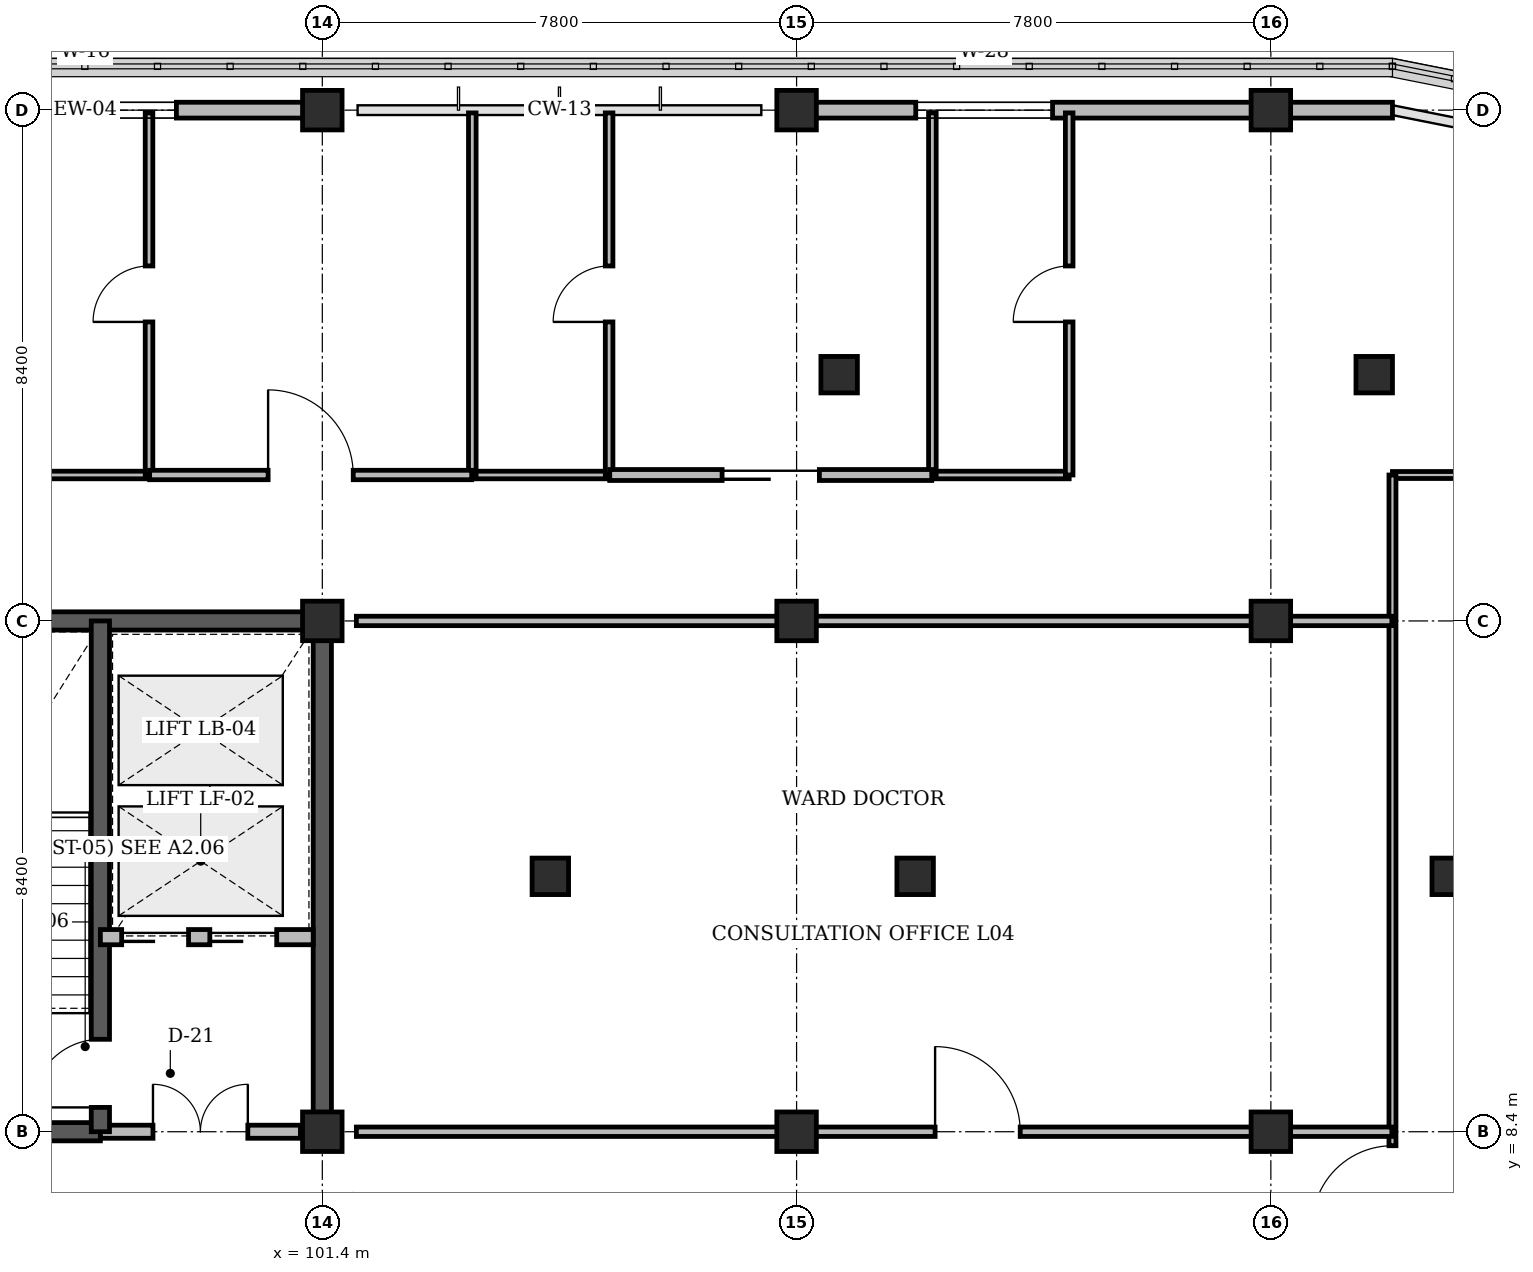
"""IFC4 building model, lengths in metres.
Left out: names, types, materials, properties, quantities, classifications, styles, units other than length and angle.
Written with IfcOpenShell. Run it as: python <this file> out.ifc"""

import sys

from ifc_helpers import new_model, si_unit, direction, frame, frame_2d, origin, origin_2d, place, context, subcontext, project, spatial, rectangle, circle, extrude, element, fill, save


model = new_model("IFC4")
c1 = context("Model", 3, precision=1e-05, world=origin(), true_north=direction((0.0, 1.0)))
c2 = subcontext(c1, "Body", "Model", "MODEL_VIEW")
j1 = project(units=[si_unit("LENGTHUNIT", "METRE"), si_unit("PLANEANGLEUNIT", "RADIAN")], contexts=[c1])
p1 = place(None, origin())
s1 = spatial("IfcSite", under=j1, at=p1, CompositionType="ELEMENT")
p2 = place(p1, origin())
s2 = spatial("IfcBuilding", under=s1, at=p2, CompositionType="ELEMENT")
p3 = place(p2, frame((0.0, 0.0, 18.0)))
s3 = spatial("IfcBuildingStorey", under=s2, at=p3, CompositionType="ELEMENT", Elevation=18.0)
p4 = place(p3, frame((93.45, 16.8, 0.0), z_axis=(0.0, 0.0, 1.0), x_axis=(1.0, 0.0, 0.0)))
e1 = element("IfcWall", 1, at=p4, inside=s3, PredefinedType="SHEAR", context=c2, shape_type="SweptSolid", body=[
    extrude(rectangle(XDim=8.1, YDim=0.3, at=frame_2d((4.05, 0.0))), origin(), (0.0, 0.0, 1.0), 3.92),
])
p5 = place(p3, frame((101.4, 8.4, 0.0), z_axis=(0.0, 0.0, 1.0), x_axis=(0.0, 1.0, 0.0)))
e2 = element("IfcWall", 2, at=p5, inside=s3, PredefinedType="SHEAR", context=c2, shape_type="SweptSolid", body=[
    extrude(rectangle(XDim=8.4, YDim=0.3, at=frame_2d((4.2, 0.0))), origin(), (0.0, 0.0, 1.0), 3.92),
])
for number, where, z_axis, x_axis in (
    (3, (101.4, 8.4, 0.0), (0.0, 0.0, 1.0), (1.0, 0.0, 0.0)),
    (4, (101.4, 16.8, 0.0), (0.0, 0.0, 1.0), (1.0, 0.0, 0.0)),
    (5, (101.4, 25.2, 0.0), (0.0, 0.0, 1.0), (1.0, 0.0, 0.0)),
    (6, (109.2, 8.4, 0.0), (0.0, 0.0, 1.0), (1.0, 0.0, 0.0)),
    (7, (109.2, 16.8, 0.0), (0.0, 0.0, 1.0), (1.0, 0.0, 0.0)),
    (8, (109.2, 25.2, 0.0), (0.0, 0.0, 1.0), (1.0, 0.0, 0.0)),
    (9, (117.0, 8.4, 0.0), (0.0, 0.0, 1.0), (1.0, 0.0, 0.0)),
    (10, (117.0, 16.8, 0.0), (0.0, 0.0, 1.0), (1.0, 0.0, 0.0)),
    (11, (117.0, 25.2, 0.0), (0.0, 0.0, 1.0), (1.0, 0.0, 0.0)),
):
    element("IfcColumn", number, at=place(p3, frame(where, z_axis=z_axis, x_axis=x_axis)), inside=s3, PredefinedType="COLUMN", context=c2, shape_type="SweptSolid", body=[
        extrude(rectangle(XDim=0.65, YDim=0.65, at=origin_2d()), origin(), (0.0, 0.0, 1.0), 4.2),
    ])
for number, where, z_axis, x_axis in (
    (12, (119.95, 12.6, 0.0), (0.0, 0.0, 1.0), (1.0, 0.0, 0.0)),
    (13, (118.7, 20.85, 0.0), (0.0, 0.0, 1.0), (1.0, 0.0, 0.0)),
    (14, (111.15, 12.6, 0.0), (0.0, 0.0, 1.0), (1.0, 0.0, 0.0)),
    (15, (109.9, 20.85, 0.0), (0.0, 0.0, 1.0), (1.0, 0.0, 0.0)),
    (16, (105.15, 12.6, 0.0), (0.0, 0.0, 1.0), (1.0, 0.0, 0.0)),
):
    element("IfcColumn", number, at=place(p3, frame(where, z_axis=z_axis, x_axis=x_axis)), inside=s3, PredefinedType="PILASTER", context=c2, shape_type="SweptSolid", body=[
        extrude(circle(Radius=0.3, at=origin_2d()), origin(), (0.0, 0.0, 1.0), 4.2),
    ])
p6 = place(p3, frame((93.89, 25.2, 0.0), z_axis=(0.0, 0.0, 1.0), x_axis=(1.0, 0.0, 0.0)))
e17 = element("IfcWall", 17, at=p6, inside=s3, PredefinedType="STANDARD", context=c2, shape_type="SweptSolid", body=[
    extrude(rectangle(XDim=7.22, YDim=0.26, at=frame_2d((3.61, 0.0))), origin(), (0.0, 0.0, 1.0), 3.255),
])
p7 = place(p6, frame((2.11, 0.0, 0.85)))
e18 = element("IfcOpeningElement", 18, at=p7, cuts=e17, PredefinedType="OPENING", context=c2, shape_type="SweptSolid", body=[
    extrude(rectangle(XDim=3.0, YDim=1.8, at=frame_2d((1.5, 0.9))), frame((0.0, 0.14, 0.0), z_axis=(0.0, -1.0, 0.0), x_axis=(1.0, 0.0, 0.0)), (0.0, 0.0, 1.0), 0.28),
])
p8 = place(p3, frame((109.49, 25.2, 0.0), z_axis=(0.0, 0.0, 1.0), x_axis=(1.0, 0.0, 0.0)))
e19 = element("IfcWall", 19, at=p8, inside=s3, PredefinedType="STANDARD", context=c2, shape_type="SweptSolid", body=[
    extrude(rectangle(XDim=9.51, YDim=0.26, at=frame_2d((4.755, 0.0))), origin(), (0.0, 0.0, 1.0), 3.255),
])
p9 = place(p8, frame((1.67, 0.0, 0.85)))
e20 = element("IfcOpeningElement", 20, at=p9, cuts=e19, PredefinedType="OPENING", context=c2, shape_type="SweptSolid", body=[
    extrude(rectangle(XDim=2.25, YDim=1.45, at=frame_2d((1.125, 0.725))), frame((0.0, 0.14, 0.0), z_axis=(0.0, -1.0, 0.0), x_axis=(1.0, 0.0, 0.0)), (0.0, 0.0, 1.0), 0.28),
])
p10 = place(p3, frame((93.6, 8.4, 0.0), z_axis=(0.0, 0.0, 1.0), x_axis=(1.0, 0.0, 0.0)))
e21 = element("IfcWall", 21, at=p10, inside=s3, PredefinedType="SHEAR", context=c2, shape_type="SweptSolid", body=[
    extrude(rectangle(XDim=4.15, YDim=0.3, at=frame_2d((2.075, 0.0))), origin(), (0.0, 0.0, 1.0), 4.2),
])
p11 = place(p10, frame((1.515, 0.0, 0.0)))
e22 = element("IfcOpeningElement", 22, at=p11, cuts=e21, PredefinedType="OPENING", context=c2, shape_type="SweptSolid", body=[
    extrude(rectangle(XDim=1.12, YDim=2.15, at=frame_2d((0.56, 1.075))), frame((0.0, 0.16, 0.0), z_axis=(0.0, -1.0, 0.0), x_axis=(1.0, 0.0, 0.0)), (0.0, 0.0, 1.0), 0.32),
])
p12 = place(p3, frame((97.75, 8.4, 0.0), z_axis=(0.0, 0.0, 1.0), x_axis=(1.0, 0.0, 0.0)))
e23 = element("IfcWall", 23, at=p12, inside=s3, PredefinedType="STANDARD", context=c2, shape_type="SweptSolid", body=[
    extrude(rectangle(XDim=3.29, YDim=0.215, at=frame_2d((1.645, 0.0))), origin(), (0.0, 0.0, 1.0), 3.22),
])
p13 = place(p12, frame((0.865, 0.0, 0.0)))
e24 = element("IfcOpeningElement", 24, at=p13, cuts=e23, PredefinedType="OPENING", context=c2, shape_type="SweptSolid", body=[
    extrude(rectangle(XDim=1.56, YDim=2.2, at=frame_2d((0.78, 1.1))), frame((0.0, 0.118, 0.0), z_axis=(0.0, -1.0, 0.0), x_axis=(1.0, 0.0, 0.0)), (0.0, 0.0, 1.0), 0.235),
])
p14 = place(p3, frame((97.75, 8.4, 0.0), z_axis=(0.0, 0.0, 1.0), x_axis=(0.0, 1.0, 0.0)))
e25 = element("IfcWall", 25, at=p14, inside=s3, PredefinedType="SHEAR", context=c2, shape_type="SweptSolid", body=[
    extrude(rectangle(XDim=8.4, YDim=0.3, at=frame_2d((4.2, 0.0))), origin(), (0.0, 0.0, 1.0), 4.2),
])
p15 = place(p14, frame((0.4, 0.0, 0.0)))
e26 = element("IfcOpeningElement", 26, at=p15, cuts=e25, PredefinedType="OPENING", context=c2, shape_type="SweptSolid", body=[
    extrude(rectangle(XDim=1.12, YDim=2.15, at=frame_2d((0.56, 1.075))), frame((0.0, 0.16, 0.0), z_axis=(0.0, -1.0, 0.0), x_axis=(1.0, 0.0, 0.0)), (0.0, 0.0, 1.0), 0.32),
])
p16 = place(p3, frame((97.75, 11.6, 0.0), z_axis=(0.0, 0.0, 1.0), x_axis=(1.0, 0.0, 0.0)))
e27 = element("IfcWall", 27, at=p16, inside=s3, PredefinedType="STANDARD", context=c2, shape_type="SweptSolid", body=[
    extrude(rectangle(XDim=3.5, YDim=0.25, at=frame_2d((1.75, 0.0))), origin(), (0.0, 0.0, 1.0), 3.9),
])
p17 = place(p16, frame((0.35, 0.0, 0.0)))
e28 = element("IfcOpeningElement", 28, at=p17, cuts=e27, PredefinedType="OPENING", context=c2, shape_type="SweptSolid", body=[
    extrude(rectangle(XDim=1.1, YDim=2.2, at=frame_2d((0.55, 1.1))), frame((0.0, 0.135, 0.0), z_axis=(0.0, -1.0, 0.0), x_axis=(1.0, 0.0, 0.0)), (0.0, 0.0, 1.0), 0.27),
])
p18 = place(p16, frame((1.8, 0.0, 0.0)))
e29 = element("IfcOpeningElement", 29, at=p18, cuts=e27, PredefinedType="OPENING", context=c2, shape_type="SweptSolid", body=[
    extrude(rectangle(XDim=1.1, YDim=2.2, at=frame_2d((0.55, 1.1))), frame((0.0, 0.135, 0.0), z_axis=(0.0, -1.0, 0.0), x_axis=(1.0, 0.0, 0.0)), (0.0, 0.0, 1.0), 0.27),
])
p19 = place(p3, frame((96.3, 19.2, 0.0), z_axis=(0.0, 0.0, 1.0), x_axis=(1.0, 0.0, 0.0)))
e30 = element("IfcWall", 30, at=p19, inside=s3, PredefinedType="PARTITIONING", context=c2, shape_type="SweptSolid", body=[
    extrude(rectangle(XDim=2.25, YDim=0.125, at=frame_2d((1.125, 0.0))), origin(), (0.0, 0.0, 1.0), 3.9),
])
p20 = place(p3, frame((98.55, 19.2, 0.0), z_axis=(0.0, 0.0, 1.0), x_axis=(0.0, 1.0, 0.0)))
e31 = element("IfcWall", 31, at=p20, inside=s3, PredefinedType="PARTITIONING", context=c2, shape_type="SweptSolid", body=[
    extrude(rectangle(XDim=5.955, YDim=0.125, at=frame_2d((2.978, 0.0))), origin(), (0.0, 0.0, 1.0), 3.9),
])
p21 = place(p20, frame((2.518, 0.0, 0.0)))
e32 = element("IfcOpeningElement", 32, at=p21, cuts=e31, PredefinedType="OPENING", context=c2, shape_type="SweptSolid", body=[
    extrude(rectangle(XDim=0.92, YDim=2.1, at=frame_2d((0.46, 1.05))), frame((0.0, 0.073, 0.0), z_axis=(0.0, -1.0, 0.0), x_axis=(1.0, 0.0, 0.0)), (0.0, 0.0, 1.0), 0.145),
])
p22 = place(p3, frame((103.867, 19.2, 0.0), z_axis=(0.0, 0.0, 1.0), x_axis=(1.0, 0.0, 0.0)))
e33 = element("IfcWall", 33, at=p22, inside=s3, PredefinedType="PARTITIONING", context=c2, shape_type="SweptSolid", body=[
    extrude(rectangle(XDim=2.25, YDim=0.125, at=frame_2d((1.125, 0.0))), origin(), (0.0, 0.0, 1.0), 3.9),
])
p23 = place(p3, frame((103.867, 19.2, 0.0), z_axis=(0.0, 0.0, 1.0), x_axis=(0.0, 1.0, 0.0)))
e34 = element("IfcWall", 34, at=p23, inside=s3, PredefinedType="PARTITIONING", context=c2, shape_type="SweptSolid", body=[
    extrude(rectangle(XDim=5.955, YDim=0.125, at=frame_2d((2.978, 0.0))), origin(), (0.0, 0.0, 1.0), 3.9),
])
p24 = place(p3, frame((106.117, 19.2, 0.0), z_axis=(0.0, 0.0, 1.0), x_axis=(0.0, 1.0, 0.0)))
e35 = element("IfcWall", 35, at=p24, inside=s3, PredefinedType="PARTITIONING", context=c2, shape_type="SweptSolid", body=[
    extrude(rectangle(XDim=5.955, YDim=0.125, at=frame_2d((2.978, 0.0))), origin(), (0.0, 0.0, 1.0), 3.9),
])
p25 = place(p24, frame((2.518, 0.0, 0.0)))
e36 = element("IfcOpeningElement", 36, at=p25, cuts=e35, PredefinedType="OPENING", context=c2, shape_type="SweptSolid", body=[
    extrude(rectangle(XDim=0.92, YDim=2.1, at=frame_2d((0.46, 1.05))), frame((0.0, 0.073, 0.0), z_axis=(0.0, -1.0, 0.0), x_axis=(1.0, 0.0, 0.0)), (0.0, 0.0, 1.0), 0.145),
])
p26 = place(p3, frame((111.433, 19.2, 0.0), z_axis=(0.0, 0.0, 1.0), x_axis=(1.0, 0.0, 0.0)))
e37 = element("IfcWall", 37, at=p26, inside=s3, PredefinedType="PARTITIONING", context=c2, shape_type="SweptSolid", body=[
    extrude(rectangle(XDim=2.25, YDim=0.125, at=frame_2d((1.125, 0.0))), origin(), (0.0, 0.0, 1.0), 3.9),
])
p27 = place(p3, frame((111.433, 19.2, 0.0), z_axis=(0.0, 0.0, 1.0), x_axis=(0.0, 1.0, 0.0)))
e38 = element("IfcWall", 38, at=p27, inside=s3, PredefinedType="PARTITIONING", context=c2, shape_type="SweptSolid", body=[
    extrude(rectangle(XDim=5.955, YDim=0.125, at=frame_2d((2.978, 0.0))), origin(), (0.0, 0.0, 1.0), 3.9),
])
p28 = place(p3, frame((113.683, 19.2, 0.0), z_axis=(0.0, 0.0, 1.0), x_axis=(0.0, 1.0, 0.0)))
e39 = element("IfcWall", 39, at=p28, inside=s3, PredefinedType="PARTITIONING", context=c2, shape_type="SweptSolid", body=[
    extrude(rectangle(XDim=5.955, YDim=0.125, at=frame_2d((2.978, 0.0))), origin(), (0.0, 0.0, 1.0), 3.9),
])
p29 = place(p28, frame((2.518, 0.0, 0.0)))
e40 = element("IfcOpeningElement", 40, at=p29, cuts=e39, PredefinedType="OPENING", context=c2, shape_type="SweptSolid", body=[
    extrude(rectangle(XDim=0.92, YDim=2.1, at=frame_2d((0.46, 1.05))), frame((0.0, 0.073, 0.0), z_axis=(0.0, -1.0, 0.0), x_axis=(1.0, 0.0, 0.0)), (0.0, 0.0, 1.0), 0.145),
])
p30 = place(p3, frame((119.0, 19.2, 0.0), z_axis=(0.0, 0.0, 1.0), x_axis=(1.0, 0.0, 0.0)))
e41 = element("IfcWall", 41, at=p30, inside=s3, PredefinedType="PARTITIONING", context=c2, shape_type="SweptSolid", body=[
    extrude(rectangle(XDim=12.1, YDim=0.115, at=frame_2d((6.05, 0.0))), origin(), (0.0, 0.0, 1.0), 3.9),
])
p31 = place(p3, frame((119.0, 6.0, 0.0), z_axis=(0.0, 0.0, 1.0), x_axis=(0.0, 1.0, 0.0)))
e42 = element("IfcWall", 42, at=p31, inside=s3, PredefinedType="PARTITIONING", context=c2, shape_type="SweptSolid", body=[
    extrude(rectangle(XDim=13.2, YDim=0.115, at=frame_2d((6.6, 0.0))), origin(), (0.0, 0.0, 1.0), 3.9),
])
p32 = place(p31, frame((0.85, 0.0, 0.0)))
e43 = element("IfcOpeningElement", 43, at=p32, cuts=e42, PredefinedType="OPENING", context=c2, shape_type="SweptSolid", body=[
    extrude(rectangle(XDim=1.32, YDim=2.15, at=frame_2d((0.66, 1.075))), frame((0.0, 0.067, 0.0), z_axis=(0.0, -1.0, 0.0), x_axis=(1.0, 0.0, 0.0)), (0.0, 0.0, 1.0), 0.135),
])
p33 = place(p3, frame((98.56, 19.2, 0.0), z_axis=(0.0, 0.0, 1.0), x_axis=(1.0, 0.0, 0.0)))
e44 = element("IfcWall", 44, at=p33, inside=s3, PredefinedType="PARTITIONING", context=c2, shape_type="SweptSolid", body=[
    extrude(rectangle(XDim=5.297, YDim=0.155, at=frame_2d((2.648, 0.0))), origin(), (0.0, 0.0, 1.0), 3.9),
])
p34 = place(p33, frame((1.948, 0.0, 0.0)))
e45 = element("IfcOpeningElement", 45, at=p34, cuts=e44, PredefinedType="OPENING", context=c2, shape_type="SweptSolid", body=[
    extrude(rectangle(XDim=1.4, YDim=2.2, at=frame_2d((0.7, 1.1))), frame((0.0, 0.087, 0.0), z_axis=(0.0, -1.0, 0.0), x_axis=(1.0, 0.0, 0.0)), (0.0, 0.0, 1.0), 0.175),
])
p35 = place(p3, frame((106.127, 19.2, 0.0), z_axis=(0.0, 0.0, 1.0), x_axis=(1.0, 0.0, 0.0)))
e46 = element("IfcWall", 46, at=p35, inside=s3, PredefinedType="PARTITIONING", context=c2, shape_type="SweptSolid", body=[
    extrude(rectangle(XDim=5.296, YDim=0.18, at=frame_2d((2.648, 0.0))), origin(), (0.0, 0.0, 1.0), 3.9),
])
p36 = place(p35, frame((1.848, 0.0, 0.0)))
e47 = element("IfcOpeningElement", 47, at=p36, cuts=e46, PredefinedType="OPENING", context=c2, shape_type="SweptSolid", body=[
    extrude(rectangle(XDim=1.6, YDim=2.25, at=frame_2d((0.8, 1.125))), frame((0.0, 0.1, 0.0), z_axis=(0.0, -1.0, 0.0), x_axis=(1.0, 0.0, 0.0)), (0.0, 0.0, 1.0), 0.2),
])
p37 = place(p3, frame((101.96, 8.4, 0.0), z_axis=(0.0, 0.0, 1.0), x_axis=(1.0, 0.0, 0.0)))
e48 = element("IfcWall", 48, at=p37, inside=s3, PredefinedType="PARTITIONING", context=c2, shape_type="SweptSolid", body=[
    extrude(rectangle(XDim=17.03, YDim=0.155, at=frame_2d((8.515, 0.0))), origin(), (0.0, 0.0, 1.0), 3.22),
])
p38 = place(p37, frame((9.518, 0.0, 0.0)))
e49 = element("IfcOpeningElement", 49, at=p38, cuts=e48, PredefinedType="OPENING", context=c2, shape_type="SweptSolid", body=[
    extrude(rectangle(XDim=1.4, YDim=2.2, at=frame_2d((0.7, 1.1))), frame((0.0, 0.087, 0.0), z_axis=(0.0, -1.0, 0.0), x_axis=(1.0, 0.0, 0.0)), (0.0, 0.0, 1.0), 0.175),
])
p39 = place(p3, frame((101.96, 16.8, 0.0), z_axis=(0.0, 0.0, 1.0), x_axis=(1.0, 0.0, 0.0)))
e50 = element("IfcWall", 50, at=p39, inside=s3, PredefinedType="PARTITIONING", context=c2, shape_type="SweptSolid", body=[
    extrude(rectangle(XDim=17.03, YDim=0.155, at=frame_2d((8.515, 0.0))), origin(), (0.0, 0.0, 1.0), 3.22),
])
p40 = place(p7, origin())
e51 = element("IfcWindow", 51, at=p40, inside=s3, PartitioningType="SINGLE_PANEL", PredefinedType="WINDOW", context=c2, shape_type="SweptSolid", body=[
    extrude(rectangle(XDim=3.0, YDim=1.8, at=frame_2d((1.5, 0.9))), frame((0.0, 0.03, 0.0), z_axis=(0.0, -1.0, 0.0), x_axis=(1.0, 0.0, 0.0)), (0.0, 0.0, 1.0), 0.06),
])
fill(e18, e51)
p41 = place(p9, origin())
e52 = element("IfcWindow", 52, at=p41, inside=s3, PartitioningType="SINGLE_PANEL", PredefinedType="WINDOW", context=c2, shape_type="SweptSolid", body=[
    extrude(rectangle(XDim=2.25, YDim=1.45, at=frame_2d((1.125, 0.725))), frame((0.0, 0.03, 0.0), z_axis=(0.0, -1.0, 0.0), x_axis=(1.0, 0.0, 0.0)), (0.0, 0.0, 1.0), 0.06),
])
fill(e20, e52)
p42 = place(p13, origin())
e53 = element("IfcDoor", 53, at=p42, inside=s3, OperationType="DOUBLE_DOOR_SINGLE_SWING", PredefinedType="DOOR", context=c2, shape_type="SweptSolid", body=[
    extrude(rectangle(XDim=1.56, YDim=2.2, at=frame_2d((0.78, 1.1))), frame((0.0, 0.025, 0.0), z_axis=(0.0, -1.0, 0.0), x_axis=(1.0, 0.0, 0.0)), (0.0, 0.0, 1.0), 0.05),
])
fill(e24, e53)
p43 = place(p15, origin())
e54 = element("IfcDoor", 54, at=p43, inside=s3, OperationType="SINGLE_SWING_LEFT", PredefinedType="DOOR", context=c2, shape_type="SweptSolid", body=[
    extrude(rectangle(XDim=1.12, YDim=2.15, at=frame_2d((0.56, 1.075))), frame((0.0, 0.025, 0.0), z_axis=(0.0, -1.0, 0.0), x_axis=(1.0, 0.0, 0.0)), (0.0, 0.0, 1.0), 0.05),
])
fill(e26, e54)
p44 = place(p17, origin())
e55 = element("IfcDoor", 55, at=p44, inside=s3, OperationType="SLIDING_TO_LEFT", PredefinedType="DOOR", context=c2, shape_type="SweptSolid", body=[
    extrude(rectangle(XDim=1.1, YDim=2.2, at=frame_2d((0.55, 1.1))), frame((0.0, 0.025, 0.0), z_axis=(0.0, -1.0, 0.0), x_axis=(1.0, 0.0, 0.0)), (0.0, 0.0, 1.0), 0.05),
])
fill(e28, e55)
p45 = place(p18, origin())
e56 = element("IfcDoor", 56, at=p45, inside=s3, OperationType="SLIDING_TO_LEFT", PredefinedType="DOOR", context=c2, shape_type="SweptSolid", body=[
    extrude(rectangle(XDim=1.1, YDim=2.2, at=frame_2d((0.55, 1.1))), frame((0.0, 0.025, 0.0), z_axis=(0.0, -1.0, 0.0), x_axis=(1.0, 0.0, 0.0)), (0.0, 0.0, 1.0), 0.05),
])
fill(e29, e56)
p46 = place(p21, origin())
e57 = element("IfcDoor", 57, at=p46, inside=s3, OperationType="SINGLE_SWING_LEFT", PredefinedType="DOOR", context=c2, shape_type="SweptSolid", body=[
    extrude(rectangle(XDim=0.92, YDim=2.1, at=frame_2d((0.46, 1.05))), frame((0.0, 0.025, 0.0), z_axis=(0.0, -1.0, 0.0), x_axis=(1.0, 0.0, 0.0)), (0.0, 0.0, 1.0), 0.05),
])
fill(e32, e57)
p47 = place(p25, origin())
e58 = element("IfcDoor", 58, at=p47, inside=s3, OperationType="SINGLE_SWING_LEFT", PredefinedType="DOOR", context=c2, shape_type="SweptSolid", body=[
    extrude(rectangle(XDim=0.92, YDim=2.1, at=frame_2d((0.46, 1.05))), frame((0.0, 0.025, 0.0), z_axis=(0.0, -1.0, 0.0), x_axis=(1.0, 0.0, 0.0)), (0.0, 0.0, 1.0), 0.05),
])
fill(e36, e58)
p48 = place(p29, origin())
e59 = element("IfcDoor", 59, at=p48, inside=s3, OperationType="SINGLE_SWING_LEFT", PredefinedType="DOOR", context=c2, shape_type="SweptSolid", body=[
    extrude(rectangle(XDim=0.92, YDim=2.1, at=frame_2d((0.46, 1.05))), frame((0.0, 0.025, 0.0), z_axis=(0.0, -1.0, 0.0), x_axis=(1.0, 0.0, 0.0)), (0.0, 0.0, 1.0), 0.05),
])
fill(e40, e59)
p49 = place(p32, origin())
e60 = element("IfcDoor", 60, at=p49, inside=s3, OperationType="SINGLE_SWING_LEFT", PredefinedType="DOOR", context=c2, shape_type="SweptSolid", body=[
    extrude(rectangle(XDim=1.32, YDim=2.15, at=frame_2d((0.66, 1.075))), frame((0.0, 0.025, 0.0), z_axis=(0.0, -1.0, 0.0), x_axis=(1.0, 0.0, 0.0)), (0.0, 0.0, 1.0), 0.05),
])
fill(e43, e60)
p50 = place(p34, origin())
e61 = element("IfcDoor", 61, at=p50, inside=s3, OperationType="SINGLE_SWING_LEFT", PredefinedType="DOOR", context=c2, shape_type="SweptSolid", body=[
    extrude(rectangle(XDim=1.4, YDim=2.2, at=frame_2d((0.7, 1.1))), frame((0.0, 0.025, 0.0), z_axis=(0.0, -1.0, 0.0), x_axis=(1.0, 0.0, 0.0)), (0.0, 0.0, 1.0), 0.05),
])
fill(e45, e61)
p51 = place(p36, origin())
e62 = element("IfcDoor", 62, at=p51, inside=s3, OperationType="SLIDING_TO_RIGHT", PredefinedType="DOOR", context=c2, shape_type="SweptSolid", body=[
    extrude(rectangle(XDim=1.6, YDim=2.25, at=frame_2d((0.8, 1.125))), frame((0.0, 0.025, 0.0), z_axis=(0.0, -1.0, 0.0), x_axis=(1.0, 0.0, 0.0)), (0.0, 0.0, 1.0), 0.05),
])
fill(e47, e62)
p52 = place(p38, origin())
e63 = element("IfcDoor", 63, at=p52, inside=s3, OperationType="SINGLE_SWING_LEFT", PredefinedType="DOOR", context=c2, shape_type="SweptSolid", body=[
    extrude(rectangle(XDim=1.4, YDim=2.2, at=frame_2d((0.7, 1.1))), frame((0.0, 0.025, 0.0), z_axis=(0.0, -1.0, 0.0), x_axis=(1.0, 0.0, 0.0)), (0.0, 0.0, 1.0), 0.05),
])
fill(e49, e63)
save(model, sys.argv[1])
